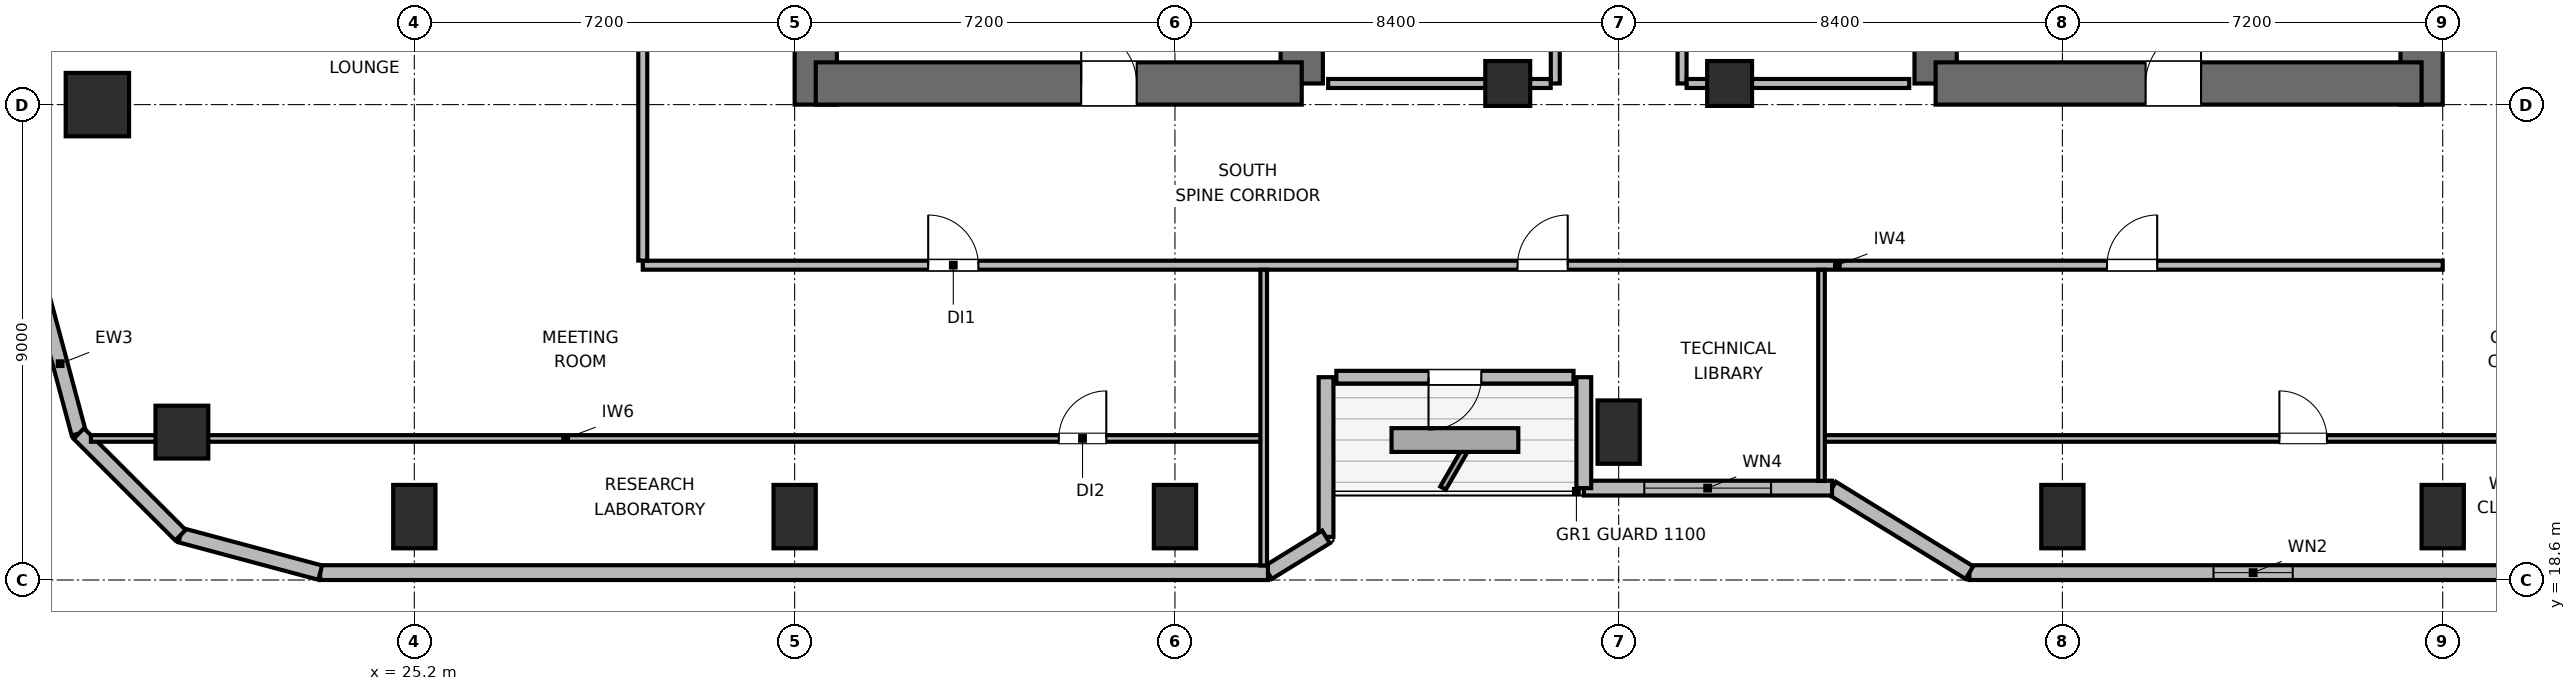
"""IFC4 building model, lengths in metres.
Left out: names, types, materials, properties, quantities, classifications, styles, units other than length and angle.
Written with IfcOpenShell. Run it as: python <this file> out.ifc"""

import sys

from ifc_helpers import new_model, si_unit, direction, frame, frame_2d, origin, origin_2d, place, context, subcontext, project, spatial, rectangle, circle, extrude, element, fill, save


model = new_model("IFC4")
c1 = context("Model", 3, precision=1e-05, world=origin(), true_north=direction((0.0, 1.0)))
c2 = subcontext(c1, "Body", "Model", "MODEL_VIEW")
j1 = project(units=[si_unit("LENGTHUNIT", "METRE"), si_unit("PLANEANGLEUNIT", "RADIAN")], contexts=[c1])
p1 = place(None, origin())
s1 = spatial("IfcSite", under=j1, at=p1, CompositionType="ELEMENT")
p2 = place(p1, origin())
s2 = spatial("IfcBuilding", under=s1, at=p2, CompositionType="ELEMENT")
p3 = place(p2, frame((0.0, 0.0, 177.9)))
s3 = spatial("IfcBuildingStorey", under=s2, at=p3, CompositionType="ELEMENT", Elevation=177.9)
p4 = place(p3, frame((32.8, 27.6, 0.0), z_axis=(0.0, 0.0, 1.0), x_axis=(0.0, 1.0, 0.0)))
e1 = element("IfcWall", 1, at=p4, inside=s3, PredefinedType="SHEAR", context=c2, shape_type="SweptSolid", body=[
    extrude(rectangle(XDim=16.8, YDim=0.8, at=frame_2d((8.4, 0.0))), origin(), (0.0, 0.0, 1.0), 3.9),
])
p5 = place(p3, frame((42.0, 28.0, 0.0), z_axis=(0.0, 0.0, 1.0), x_axis=(0.0, 1.0, 0.0)))
e2 = element("IfcWall", 2, at=p5, inside=s3, PredefinedType="SHEAR", context=c2, shape_type="SweptSolid", body=[
    extrude(rectangle(XDim=6.4, YDim=0.8, at=frame_2d((3.2, 0.0))), origin(), (0.0, 0.0, 1.0), 3.9),
])
p6 = place(p3, frame((32.8, 28.0, 0.0), z_axis=(0.0, 0.0, 1.0), x_axis=(1.0, 0.0, 0.0)))
e3 = element("IfcWall", 3, at=p6, inside=s3, PredefinedType="SHEAR", context=c2, shape_type="SweptSolid", body=[
    extrude(rectangle(XDim=9.2, YDim=0.8, at=frame_2d((4.6, 0.0))), origin(), (0.0, 0.0, 1.0), 3.9),
])
p7 = place(p6, frame((5.025, 0.0, 0.0)))
e4 = element("IfcOpeningElement", 4, at=p7, cuts=e3, PredefinedType="OPENING", context=c2, shape_type="SweptSolid", body=[
    extrude(rectangle(XDim=1.05, YDim=2.04, at=frame_2d((0.525, 1.02))), frame((0.0, 0.41, 0.0), z_axis=(0.0, -1.0, 0.0), x_axis=(1.0, 0.0, 0.0)), (0.0, 0.0, 1.0), 0.82),
])
p8 = place(p3, frame((54.0, 28.0, 0.0), z_axis=(0.0, 0.0, 1.0), x_axis=(0.0, 1.0, 0.0)))
e5 = element("IfcWall", 5, at=p8, inside=s3, PredefinedType="SHEAR", context=c2, shape_type="SweptSolid", body=[
    extrude(rectangle(XDim=7.8, YDim=0.8, at=frame_2d((3.9, 0.0))), origin(), (0.0, 0.0, 1.0), 3.9),
])
p9 = place(p3, frame((63.2, 27.6, 0.0), z_axis=(0.0, 0.0, 1.0), x_axis=(0.0, 1.0, 0.0)))
e6 = element("IfcWall", 6, at=p9, inside=s3, PredefinedType="SHEAR", context=c2, shape_type="SweptSolid", body=[
    extrude(rectangle(XDim=16.8, YDim=0.8, at=frame_2d((8.4, 0.0))), origin(), (0.0, 0.0, 1.0), 3.9),
])
p10 = place(p3, frame((54.0, 28.0, 0.0), z_axis=(0.0, 0.0, 1.0), x_axis=(1.0, 0.0, 0.0)))
e7 = element("IfcWall", 7, at=p10, inside=s3, PredefinedType="SHEAR", context=c2, shape_type="SweptSolid", body=[
    extrude(rectangle(XDim=9.2, YDim=0.8, at=frame_2d((4.6, 0.0))), origin(), (0.0, 0.0, 1.0), 3.9),
])
p11 = place(p10, frame((3.975, 0.0, 0.0)))
e8 = element("IfcOpeningElement", 8, at=p11, cuts=e7, PredefinedType="OPENING", context=c2, shape_type="SweptSolid", body=[
    extrude(rectangle(XDim=1.05, YDim=2.04, at=frame_2d((0.525, 1.02))), frame((0.0, 0.41, 0.0), z_axis=(0.0, -1.0, 0.0), x_axis=(1.0, 0.0, 0.0)), (0.0, 0.0, 1.0), 0.82),
])
p12 = place(p3, frame((20.8, 21.4, 0.0), z_axis=(0.0, 0.0, 1.0), x_axis=(1.0, 0.0, 0.0)))
e9 = element("IfcColumn", 9, at=p12, inside=s3, PredefinedType="COLUMN", context=c2, shape_type="SweptSolid", body=[
    extrude(circle(Radius=0.5, at=origin_2d()), origin(), (0.0, 0.0, 1.0), 3.9),
])
for number, where, z_axis, x_axis in (
    (10, (25.2, 19.8, 0.0), (0.0, 0.0, 1.0), (1.0, 0.0, 0.0)),
    (11, (32.4, 19.8, 0.0), (0.0, 0.0, 1.0), (1.0, 0.0, 0.0)),
    (12, (39.6, 19.8, 0.0), (0.0, 0.0, 1.0), (1.0, 0.0, 0.0)),
    (13, (48.0, 21.4, 0.0), (0.0, 0.0, 1.0), (1.0, 0.0, 0.0)),
    (14, (56.4, 19.8, 0.0), (0.0, 0.0, 1.0), (1.0, 0.0, 0.0)),
    (15, (63.6, 19.8, 0.0), (0.0, 0.0, 1.0), (1.0, 0.0, 0.0)),
):
    element("IfcColumn", number, at=place(p3, frame(where, z_axis=z_axis, x_axis=x_axis)), inside=s3, PredefinedType="COLUMN", context=c2, shape_type="SweptSolid", body=[
        extrude(rectangle(XDim=0.8, YDim=1.2, at=origin_2d()), origin(), (0.0, 0.0, 1.0), 3.9),
    ])
p13 = place(p3, frame((19.2, 27.6, 0.0), z_axis=(0.0, 0.0, 1.0), x_axis=(1.0, 0.0, 0.0)))
e16 = element("IfcColumn", 16, at=p13, inside=s3, PredefinedType="COLUMN", context=c2, shape_type="SweptSolid", body=[
    extrude(rectangle(XDim=1.2, YDim=1.2, at=origin_2d()), origin(), (0.0, 0.0, 1.0), 3.9),
])
for number, where, z_axis, x_axis in (
    (17, (45.9, 28.0, 0.0), (0.0, 0.0, 1.0), (1.0, 0.0, 0.0)),
    (18, (50.1, 28.0, 0.0), (0.0, 0.0, 1.0), (1.0, 0.0, 0.0)),
):
    element("IfcColumn", number, at=place(p3, frame(where, z_axis=z_axis, x_axis=x_axis)), inside=s3, PredefinedType="COLUMN", context=c2, shape_type="SweptSolid", body=[
        extrude(rectangle(XDim=0.85, YDim=0.85, at=origin_2d()), origin(), (0.0, 0.0, 1.0), 3.9),
    ])
p14 = place(p3, frame((18.848, 21.373, 0.0), z_axis=(0.0, 0.0, 1.0), x_axis=(-0.258672222976, 0.9659651552, 0.0)))
e19 = element("IfcWall", 19, at=p14, inside=s3, PredefinedType="SOLIDWALL", context=c2, shape_type="SweptSolid", body=[
    extrude(rectangle(XDim=2.739, YDim=0.28, at=frame_2d((1.37, 0.0))), origin(), (0.0, 0.0, 1.0), 3.68),
])
p15 = place(p3, frame((65.382, 18.74, 0.0), z_axis=(0.0, 0.0, 1.0), x_axis=(-1.0, 0.0, 0.0)))
e20 = element("IfcWall", 20, at=p15, inside=s3, PredefinedType="SOLIDWALL", context=c2, shape_type="SweptSolid", body=[
    extrude(rectangle(XDim=10.742, YDim=0.28, at=frame_2d((5.371, 0.0))), origin(), (0.0, 0.0, 1.0), 3.68),
])
p16 = place(p15, frame((4.621, 0.0, 0.85)))
e21 = element("IfcOpeningElement", 21, at=p16, cuts=e20, PredefinedType="OPENING", context=c2, shape_type="SweptSolid", body=[
    extrude(rectangle(XDim=1.5, YDim=1.1, at=frame_2d((0.75, 0.55))), frame((0.0, 0.15, 0.0), z_axis=(0.0, -1.0, 0.0), x_axis=(1.0, 0.0, 0.0)), (0.0, 0.0, 1.0), 0.3),
])
p17 = place(p3, frame((54.64, 18.74, 0.0), z_axis=(0.0, 0.0, 1.0), x_axis=(-0.851652825334, 0.524106349037, 0.0)))
e22 = element("IfcWall", 22, at=p17, inside=s3, PredefinedType="SOLIDWALL", context=c2, shape_type="SweptSolid", body=[
    extrude(rectangle(XDim=3.053, YDim=0.28, at=frame_2d((1.526, 0.0))), origin(), (0.0, 0.0, 1.0), 2.265),
])
p18 = place(p3, frame((52.04, 20.34, 0.0), z_axis=(0.0, 0.0, 1.0), x_axis=(-1.0, 0.0, 0.0)))
e23 = element("IfcWall", 23, at=p18, inside=s3, PredefinedType="SOLIDWALL", context=c2, shape_type="SweptSolid", body=[
    extrude(rectangle(XDim=4.699, YDim=0.28, at=frame_2d((2.35, 0.0))), origin(), (0.0, 0.0, 1.0), 2.265),
])
p19 = place(p18, frame((1.155, 0.0, 0.85)))
e24 = element("IfcOpeningElement", 24, at=p19, cuts=e23, PredefinedType="OPENING", context=c2, shape_type="SweptSolid", body=[
    extrude(rectangle(XDim=2.4, YDim=1.15, at=frame_2d((1.2, 0.575))), frame((0.0, 0.15, 0.0), z_axis=(0.0, -1.0, 0.0), x_axis=(1.0, 0.0, 0.0)), (0.0, 0.0, 1.0), 0.3),
])
p20 = place(p3, frame((47.34, 20.34, 0.0), z_axis=(0.0, 0.0, 1.0), x_axis=(0.0, 1.0, 0.0)))
e25 = element("IfcWall", 25, at=p20, inside=s3, PredefinedType="SOLIDWALL", context=c2, shape_type="SweptSolid", body=[
    extrude(rectangle(XDim=2.1, YDim=0.28, at=frame_2d((1.05, 0.0))), origin(), (0.0, 0.0, 1.0), 2.265),
])
p21 = place(p3, frame((47.145, 22.44, 0.0), z_axis=(0.0, 0.0, 1.0), x_axis=(-1.0, 0.0, 0.0)))
e26 = element("IfcWall", 26, at=p21, inside=s3, PredefinedType="SOLIDWALL", context=c2, shape_type="SweptSolid", body=[
    extrude(rectangle(XDim=4.49, YDim=0.24, at=frame_2d((2.245, 0.0))), origin(), (0.0, 0.0, 1.0), 3.68),
])
p22 = place(p21, frame((1.745, 0.0, 0.0)))
e27 = element("IfcOpeningElement", 27, at=p22, cuts=e26, PredefinedType="OPENING", context=c2, shape_type="SweptSolid", body=[
    extrude(rectangle(XDim=1.0, YDim=2.02, at=frame_2d((0.5, 1.01))), frame((0.0, 0.13, 0.0), z_axis=(0.0, -1.0, 0.0), x_axis=(1.0, 0.0, 0.0)), (0.0, 0.0, 1.0), 0.26),
])
p23 = place(p3, frame((42.46, 22.44, 0.0), z_axis=(0.0, 0.0, 1.0), x_axis=(0.0, -1.0, 0.0)))
e28 = element("IfcWall", 28, at=p23, inside=s3, PredefinedType="SOLIDWALL", context=c2, shape_type="SweptSolid", body=[
    extrude(rectangle(XDim=3.024, YDim=0.28, at=frame_2d((1.512, 0.0))), origin(), (0.0, 0.0, 1.0), 2.265),
])
p24 = place(p3, frame((42.46, 19.416, 0.0), z_axis=(0.0, 0.0, 1.0), x_axis=(-0.851801140441, -0.523865266212, 0.0)))
e29 = element("IfcWall", 29, at=p24, inside=s3, PredefinedType="SOLIDWALL", context=c2, shape_type="SweptSolid", body=[
    extrude(rectangle(XDim=1.291, YDim=0.28, at=frame_2d((0.646, 0.0))), origin(), (0.0, 0.0, 1.0), 3.68),
])
p25 = place(p3, frame((41.36, 18.74, 0.0), z_axis=(0.0, 0.0, 1.0), x_axis=(-1.0, 0.0, 0.0)))
e30 = element("IfcWall", 30, at=p25, inside=s3, PredefinedType="SOLIDWALL", context=c2, shape_type="SweptSolid", body=[
    extrude(rectangle(XDim=17.942, YDim=0.28, at=frame_2d((8.971, 0.0))), origin(), (0.0, 0.0, 1.0), 3.68),
])
p26 = place(p3, frame((23.418, 18.74, 0.0), z_axis=(0.0, 0.0, 1.0), x_axis=(-0.965971118627, 0.258649952598, 0.0)))
e31 = element("IfcWall", 31, at=p26, inside=s3, PredefinedType="SOLIDWALL", context=c2, shape_type="SweptSolid", body=[
    extrude(rectangle(XDim=2.739, YDim=0.28, at=frame_2d((1.37, 0.0))), origin(), (0.0, 0.0, 1.0), 3.68),
])
p27 = place(p3, frame((20.772, 19.448, 0.0), z_axis=(0.0, 0.0, 1.0), x_axis=(-0.707106781187, 0.707106781187, 0.0)))
e32 = element("IfcWall", 32, at=p27, inside=s3, PredefinedType="SOLIDWALL", context=c2, shape_type="SweptSolid", body=[
    extrude(rectangle(XDim=2.721, YDim=0.28, at=frame_2d((1.36, 0.0))), origin(), (0.0, 0.0, 1.0), 3.68),
])
p28 = place(p3, frame((46.8, 28.0, 0.0), z_axis=(0.0, 0.0, 1.0), x_axis=(0.0, 1.0, 0.0)))
e33 = element("IfcWall", 33, at=p28, inside=s3, PredefinedType="PARTITIONING", context=c2, shape_type="SweptSolid", body=[
    extrude(rectangle(XDim=4.5, YDim=0.17, at=frame_2d((2.25, 0.0))), origin(), (0.0, 0.0, 1.0), 3.68),
])
p29 = place(p28, frame((0.99, 0.0, 0.0)))
e34 = element("IfcOpeningElement", 34, at=p29, cuts=e33, PredefinedType="OPENING", context=c2, shape_type="SweptSolid", body=[
    extrude(rectangle(XDim=0.9, YDim=2.02, at=frame_2d((0.45, 1.01))), frame((0.0, 0.095, 0.0), z_axis=(0.0, -1.0, 0.0), x_axis=(1.0, 0.0, 0.0)), (0.0, 0.0, 1.0), 0.19),
])
p30 = place(p28, frame((3.24, 0.0, 0.0)))
e35 = element("IfcOpeningElement", 35, at=p30, cuts=e33, PredefinedType="OPENING", context=c2, shape_type="SweptSolid", body=[
    extrude(rectangle(XDim=0.9, YDim=2.02, at=frame_2d((0.45, 1.01))), frame((0.0, 0.095, 0.0), z_axis=(0.0, -1.0, 0.0), x_axis=(1.0, 0.0, 0.0)), (0.0, 0.0, 1.0), 0.19),
])
p31 = place(p3, frame((42.5, 28.0, 0.0), z_axis=(0.0, 0.0, 1.0), x_axis=(1.0, 0.0, 0.0)))
e36 = element("IfcWall", 36, at=p31, inside=s3, PredefinedType="PARTITIONING", context=c2, shape_type="SweptSolid", body=[
    extrude(rectangle(XDim=4.213, YDim=0.17, at=frame_2d((2.106, 0.0))), origin(), (0.0, 0.0, 1.0), 2.765),
])
p32 = place(p3, frame((49.2, 28.0, 0.0), z_axis=(0.0, 0.0, 1.0), x_axis=(0.0, 1.0, 0.0)))
e37 = element("IfcWall", 37, at=p32, inside=s3, PredefinedType="PARTITIONING", context=c2, shape_type="SweptSolid", body=[
    extrude(rectangle(XDim=4.5, YDim=0.17, at=frame_2d((2.25, 0.0))), origin(), (0.0, 0.0, 1.0), 3.68),
])
p33 = place(p32, frame((0.675, 0.0, 0.0)))
e38 = element("IfcOpeningElement", 38, at=p33, cuts=e37, PredefinedType="OPENING", context=c2, shape_type="SweptSolid", body=[
    extrude(rectangle(XDim=0.9, YDim=2.02, at=frame_2d((0.45, 1.01))), frame((0.0, 0.095, 0.0), z_axis=(0.0, -1.0, 0.0), x_axis=(1.0, 0.0, 0.0)), (0.0, 0.0, 1.0), 0.19),
])
p34 = place(p32, frame((2.925, 0.0, 0.0)))
e39 = element("IfcOpeningElement", 39, at=p34, cuts=e37, PredefinedType="OPENING", context=c2, shape_type="SweptSolid", body=[
    extrude(rectangle(XDim=0.9, YDim=2.02, at=frame_2d((0.45, 1.01))), frame((0.0, 0.095, 0.0), z_axis=(0.0, -1.0, 0.0), x_axis=(1.0, 0.0, 0.0)), (0.0, 0.0, 1.0), 0.19),
])
p35 = place(p3, frame((49.287, 28.0, 0.0), z_axis=(0.0, 0.0, 1.0), x_axis=(1.0, 0.0, 0.0)))
e40 = element("IfcWall", 40, at=p35, inside=s3, PredefinedType="PARTITIONING", context=c2, shape_type="SweptSolid", body=[
    extrude(rectangle(XDim=4.213, YDim=0.17, at=frame_2d((2.106, 0.0))), origin(), (0.0, 0.0, 1.0), 2.765),
])
p36 = place(p3, frame((29.525, 24.56, 0.0), z_axis=(0.0, 0.0, 1.0), x_axis=(1.0, 0.0, 0.0)))
e41 = element("IfcWall", 41, at=p36, inside=s3, PredefinedType="PARTITIONING", context=c2, shape_type="SweptSolid", body=[
    extrude(rectangle(XDim=34.075, YDim=0.17, at=frame_2d((17.038, 0.0))), origin(), (0.0, 0.0, 1.0), 3.68),
])
p37 = place(p36, frame((5.403, 0.0, 0.0)))
e42 = element("IfcOpeningElement", 42, at=p37, cuts=e41, PredefinedType="OPENING", context=c2, shape_type="SweptSolid", body=[
    extrude(rectangle(XDim=0.95, YDim=2.04, at=frame_2d((0.475, 1.02))), frame((0.0, 0.095, 0.0), z_axis=(0.0, -1.0, 0.0), x_axis=(1.0, 0.0, 0.0)), (0.0, 0.0, 1.0), 0.19),
])
p38 = place(p36, frame((16.56, 0.0, 0.0)))
e43 = element("IfcOpeningElement", 43, at=p38, cuts=e41, PredefinedType="OPENING", context=c2, shape_type="SweptSolid", body=[
    extrude(rectangle(XDim=0.95, YDim=2.04, at=frame_2d((0.475, 1.02))), frame((0.0, 0.095, 0.0), z_axis=(0.0, -1.0, 0.0), x_axis=(1.0, 0.0, 0.0)), (0.0, 0.0, 1.0), 0.19),
])
p39 = place(p36, frame((27.72, 0.0, 0.0)))
e44 = element("IfcOpeningElement", 44, at=p39, cuts=e41, PredefinedType="OPENING", context=c2, shape_type="SweptSolid", body=[
    extrude(rectangle(XDim=0.95, YDim=2.04, at=frame_2d((0.475, 1.02))), frame((0.0, 0.095, 0.0), z_axis=(0.0, -1.0, 0.0), x_axis=(1.0, 0.0, 0.0)), (0.0, 0.0, 1.0), 0.19),
])
p40 = place(p3, frame((29.525, 24.647, 0.0), z_axis=(0.0, 0.0, 1.0), x_axis=(0.0, 1.0, 0.0)))
e45 = element("IfcWall", 45, at=p40, inside=s3, PredefinedType="PARTITIONING", context=c2, shape_type="SweptSolid", body=[
    extrude(rectangle(XDim=9.753, YDim=0.17, at=frame_2d((4.876, 0.0))), origin(), (0.0, 0.0, 1.0), 3.68),
])
p41 = place(p40, frame((4.358, 0.0, 0.0)))
e46 = element("IfcOpeningElement", 46, at=p41, cuts=e45, PredefinedType="OPENING", context=c2, shape_type="SweptSolid", body=[
    extrude(rectangle(XDim=0.95, YDim=2.04, at=frame_2d((0.475, 1.02))), frame((0.0, 0.095, 0.0), z_axis=(0.0, -1.0, 0.0), x_axis=(1.0, 0.0, 0.0)), (0.0, 0.0, 1.0), 0.19),
])
p42 = place(p3, frame((19.078, 21.28, 0.0), z_axis=(0.0, 0.0, 1.0), x_axis=(1.0, 0.0, 0.0)))
e47 = element("IfcWall", 47, at=p42, inside=s3, PredefinedType="PARTITIONING", context=c2, shape_type="SweptSolid", body=[
    extrude(rectangle(XDim=22.202, YDim=0.125, at=frame_2d((11.101, 0.0))), origin(), (0.0, 0.0, 1.0), 2.265),
])
p43 = place(p42, frame((18.322, 0.0, 0.0)))
e48 = element("IfcOpeningElement", 48, at=p43, cuts=e47, PredefinedType="OPENING", context=c2, shape_type="SweptSolid", body=[
    extrude(rectangle(XDim=0.9, YDim=2.02, at=frame_2d((0.45, 1.01))), frame((0.0, 0.073, 0.0), z_axis=(0.0, -1.0, 0.0), x_axis=(1.0, 0.0, 0.0)), (0.0, 0.0, 1.0), 0.145),
])
p44 = place(p3, frame((41.28, 18.875, 0.0), z_axis=(0.0, 0.0, 1.0), x_axis=(0.0, 1.0, 0.0)))
e49 = element("IfcWall", 49, at=p44, inside=s3, PredefinedType="PARTITIONING", context=c2, shape_type="SweptSolid", body=[
    extrude(rectangle(XDim=5.598, YDim=0.125, at=frame_2d((2.799, 0.0))), origin(), (0.0, 0.0, 1.0), 3.043),
])
p45 = place(p3, frame((51.84, 21.28, 0.0), z_axis=(0.0, 0.0, 1.0), x_axis=(1.0, 0.0, 0.0)))
e50 = element("IfcWall", 50, at=p45, inside=s3, PredefinedType="PARTITIONING", context=c2, shape_type="SweptSolid", body=[
    extrude(rectangle(XDim=17.882, YDim=0.125, at=frame_2d((8.941, 0.0))), origin(), (0.0, 0.0, 1.0), 2.265),
])
p46 = place(p45, frame((8.668, 0.0, 0.0)))
e51 = element("IfcOpeningElement", 51, at=p46, cuts=e50, PredefinedType="OPENING", context=c2, shape_type="SweptSolid", body=[
    extrude(rectangle(XDim=0.9, YDim=2.02, at=frame_2d((0.45, 1.01))), frame((0.0, 0.073, 0.0), z_axis=(0.0, -1.0, 0.0), x_axis=(1.0, 0.0, 0.0)), (0.0, 0.0, 1.0), 0.145),
])
p47 = place(p3, frame((51.84, 20.475, 0.0), z_axis=(0.0, 0.0, 1.0), x_axis=(0.0, 1.0, 0.0)))
e52 = element("IfcWall", 52, at=p47, inside=s3, PredefinedType="PARTITIONING", context=c2, shape_type="SweptSolid", body=[
    extrude(rectangle(XDim=3.998, YDim=0.125, at=frame_2d((1.999, 0.0))), origin(), (0.0, 0.0, 1.0), 3.68),
])
p48 = place(p16, origin())
e53 = element("IfcWindow", 53, at=p48, inside=s3, PartitioningType="SINGLE_PANEL", PredefinedType="WINDOW", context=c2, shape_type="SweptSolid", body=[
    extrude(rectangle(XDim=1.5, YDim=1.1, at=frame_2d((0.75, 0.55))), frame((0.0, 0.03, 0.0), z_axis=(0.0, -1.0, 0.0), x_axis=(1.0, 0.0, 0.0)), (0.0, 0.0, 1.0), 0.06),
])
fill(e21, e53)
p49 = place(p19, origin())
e54 = element("IfcWindow", 54, at=p49, inside=s3, PartitioningType="SINGLE_PANEL", PredefinedType="WINDOW", context=c2, shape_type="SweptSolid", body=[
    extrude(rectangle(XDim=2.4, YDim=1.15, at=frame_2d((1.2, 0.575))), frame((0.0, 0.03, 0.0), z_axis=(0.0, -1.0, 0.0), x_axis=(1.0, 0.0, 0.0)), (0.0, 0.0, 1.0), 0.06),
])
fill(e24, e54)
p50 = place(p22, origin())
e55 = element("IfcDoor", 55, at=p50, inside=s3, OperationType="SINGLE_SWING_RIGHT", PredefinedType="DOOR", context=c2, shape_type="SweptSolid", body=[
    extrude(rectangle(XDim=1.0, YDim=2.02, at=frame_2d((0.5, 1.01))), frame((0.0, 0.025, 0.0), z_axis=(0.0, -1.0, 0.0), x_axis=(1.0, 0.0, 0.0)), (0.0, 0.0, 1.0), 0.05),
])
fill(e27, e55)
p51 = place(p7, origin())
e56 = element("IfcDoor", 56, at=p51, inside=s3, OperationType="SINGLE_SWING_LEFT", PredefinedType="DOOR", context=c2, shape_type="SweptSolid", body=[
    extrude(rectangle(XDim=1.05, YDim=2.04, at=frame_2d((0.525, 1.02))), frame((0.0, 0.025, 0.0), z_axis=(0.0, -1.0, 0.0), x_axis=(1.0, 0.0, 0.0)), (0.0, 0.0, 1.0), 0.05),
])
fill(e4, e56)
p52 = place(p11, origin())
e57 = element("IfcDoor", 57, at=p52, inside=s3, OperationType="SINGLE_SWING_RIGHT", PredefinedType="DOOR", context=c2, shape_type="SweptSolid", body=[
    extrude(rectangle(XDim=1.05, YDim=2.04, at=frame_2d((0.525, 1.02))), frame((0.0, 0.025, 0.0), z_axis=(0.0, -1.0, 0.0), x_axis=(1.0, 0.0, 0.0)), (0.0, 0.0, 1.0), 0.05),
])
fill(e8, e57)
p53 = place(p43, origin())
e58 = element("IfcDoor", 58, at=p53, inside=s3, OperationType="SINGLE_SWING_RIGHT", PredefinedType="DOOR", context=c2, shape_type="SweptSolid", body=[
    extrude(rectangle(XDim=0.9, YDim=2.02, at=frame_2d((0.45, 1.01))), frame((0.0, 0.025, 0.0), z_axis=(0.0, -1.0, 0.0), x_axis=(1.0, 0.0, 0.0)), (0.0, 0.0, 1.0), 0.05),
])
fill(e48, e58)
p54 = place(p37, origin())
e59 = element("IfcDoor", 59, at=p54, inside=s3, OperationType="SINGLE_SWING_LEFT", PredefinedType="DOOR", context=c2, shape_type="SweptSolid", body=[
    extrude(rectangle(XDim=0.95, YDim=2.04, at=frame_2d((0.475, 1.02))), frame((0.0, 0.025, 0.0), z_axis=(0.0, -1.0, 0.0), x_axis=(1.0, 0.0, 0.0)), (0.0, 0.0, 1.0), 0.05),
])
fill(e42, e59)
p55 = place(p38, origin())
e60 = element("IfcDoor", 60, at=p55, inside=s3, OperationType="SINGLE_SWING_RIGHT", PredefinedType="DOOR", context=c2, shape_type="SweptSolid", body=[
    extrude(rectangle(XDim=0.95, YDim=2.04, at=frame_2d((0.475, 1.02))), frame((0.0, 0.025, 0.0), z_axis=(0.0, -1.0, 0.0), x_axis=(1.0, 0.0, 0.0)), (0.0, 0.0, 1.0), 0.05),
])
fill(e43, e60)
p56 = place(p46, origin())
e61 = element("IfcDoor", 61, at=p56, inside=s3, OperationType="SINGLE_SWING_LEFT", PredefinedType="DOOR", context=c2, shape_type="SweptSolid", body=[
    extrude(rectangle(XDim=0.9, YDim=2.02, at=frame_2d((0.45, 1.01))), frame((0.0, 0.025, 0.0), z_axis=(0.0, -1.0, 0.0), x_axis=(1.0, 0.0, 0.0)), (0.0, 0.0, 1.0), 0.05),
])
fill(e51, e61)
p57 = place(p39, origin())
e62 = element("IfcDoor", 62, at=p57, inside=s3, OperationType="SINGLE_SWING_RIGHT", PredefinedType="DOOR", context=c2, shape_type="SweptSolid", body=[
    extrude(rectangle(XDim=0.95, YDim=2.04, at=frame_2d((0.475, 1.02))), frame((0.0, 0.025, 0.0), z_axis=(0.0, -1.0, 0.0), x_axis=(1.0, 0.0, 0.0)), (0.0, 0.0, 1.0), 0.05),
])
fill(e44, e62)
save(model, sys.argv[1])
